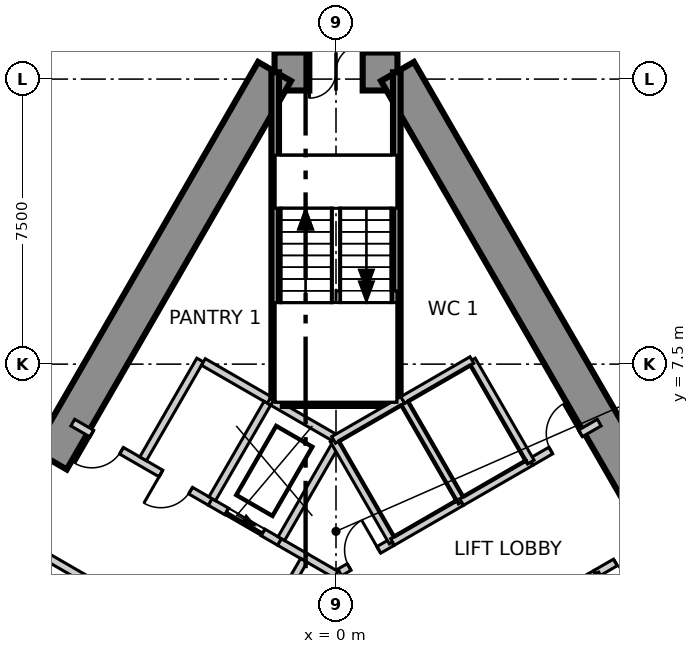
"""IFC4 building model, lengths in metres.
Left out: names, types, materials, properties, quantities, classifications, styles, units other than length and angle.
Written with IfcOpenShell. Run it as: python <this file> out.ifc"""

import sys

from ifc_helpers import new_model, si_unit, direction, frame, frame_2d, origin, place, context, subcontext, project, spatial, polyline, rectangle, outline, extrude, element, fill, save


model = new_model("IFC4")
c1 = context("Model", 3, precision=1e-05, world=origin(), true_north=direction((0.0, 1.0)))
c2 = subcontext(c1, "Body", "Model", "MODEL_VIEW")
j1 = project(units=[si_unit("LENGTHUNIT", "METRE"), si_unit("PLANEANGLEUNIT", "RADIAN")], contexts=[c1])
p1 = place(None, origin())
s1 = spatial("IfcSite", under=j1, at=p1, CompositionType="ELEMENT")
p2 = place(p1, origin())
s2 = spatial("IfcBuilding", under=s1, at=p2, CompositionType="ELEMENT")
p3 = place(p2, frame((0.0, 0.0, -5.5)))
s3 = spatial("IfcBuildingStorey", under=s2, at=p3, CompositionType="ELEMENT", Elevation=-5.5)
for number, where, z_axis, x_axis in (
    (1, (34.944, -16.125, -0.4), (0.0, 0.0, 1.0), (-0.5, 0.866, 0.0)),
    (2, (-3.507, 38.325, -0.4), (0.0, 0.0, 1.0), (-0.5, -0.866, 0.0)),
):
    element("IfcWall", number, at=place(p3, frame(where, z_axis=z_axis, x_axis=x_axis)), inside=s3, PredefinedType="SOLIDWALL", context=c2, shape_type="SweptSolid", body=[
        extrude(rectangle(XDim=62.874, YDim=0.6, at=frame_2d((31.437, 0.0))), origin(), (0.0, 0.0, 1.0), 5.5),
    ])
p4 = place(p3, frame((1.617, 15.2, -0.4), z_axis=(0.0, 0.0, 1.0), x_axis=(-1.0, 0.0, 0.0)))
e3 = element("IfcWall", 3, at=p4, inside=s3, PredefinedType="SHEAR", context=c2, shape_type="SweptSolid", body=[
    extrude(outline(polyline([(-0.288, -0.5), (1.617, -0.5), (3.522, -0.5), (2.945, 0.5), (1.617, 0.5), (0.289, 0.5), (-0.288, -0.5)])), origin(), (0.0, 0.0, 1.0), 5.5),
])
p5 = place(p4, frame((0.917, 0.0, 0.4)))
e4 = element("IfcOpeningElement", 4, at=p5, cuts=e3, PredefinedType="OPENING", context=c2, shape_type="SweptSolid", body=[
    extrude(rectangle(XDim=1.4, YDim=2.1, at=frame_2d((0.7, 1.05))), frame((0.0, 0.51, 0.0), z_axis=(0.0, -1.0, 0.0), x_axis=(1.0, 0.0, 0.0)), (0.0, 0.0, 1.0), 1.02),
])
p6 = place(p3, frame((-1.617, 15.2, -0.4), z_axis=(0.0, 0.0, 1.0), x_axis=(-0.499992141631, -0.866029940768, 0.0)))
e5 = element("IfcWall", 5, at=p6, inside=s3, PredefinedType="SHEAR", context=c2, shape_type="SweptSolid", body=[
    extrude(outline(polyline([(-0.289, -0.499), (1.656, -0.499), (3.601, -0.499), (5.547, -0.499), (7.492, -0.499), (9.437, -0.5), (11.382, -0.5), (13.328, -0.5), (15.273, -0.5), (17.218, -0.5), (19.163, -0.5), (21.109, -0.5), (23.054, -0.5), (24.999, -0.5), (24.422, 0.5), (22.566, 0.5), (20.709, 0.5), (18.853, 0.5), (16.997, 0.5), (15.14, 0.5), (13.284, 0.5), (11.427, 0.5), (9.571, 0.5), (7.715, 0.5), (5.858, 0.5), (4.002, 0.5), (2.146, 0.5), (0.289, 0.5), (-0.289, -0.499)])), origin(), (0.0, 0.0, 1.0), 5.5),
])
p7 = place(p6, frame((11.805, 0.0, 0.4)))
e6 = element("IfcOpeningElement", 6, at=p7, cuts=e5, PredefinedType="OPENING", context=c2, shape_type="SweptSolid", body=[
    extrude(rectangle(XDim=1.1, YDim=2.1, at=frame_2d((0.55, 1.05))), frame((0.0, 0.51, 0.0), z_axis=(0.0, -1.0, 0.0), x_axis=(1.0, 0.0, 0.0)), (0.0, 0.0, 1.0), 1.02),
])
p8 = place(p3, frame((13.972, -6.2, -0.4), z_axis=(0.0, 0.0, 1.0), x_axis=(-0.499992141631, 0.866029940768, 0.0)))
e7 = element("IfcWall", 7, at=p8, inside=s3, PredefinedType="SHEAR", context=c2, shape_type="SweptSolid", body=[
    extrude(outline(polyline([(-0.288, -0.5), (1.657, -0.5), (3.602, -0.5), (5.547, -0.5), (7.493, -0.5), (9.438, -0.5), (11.383, -0.5), (13.328, -0.5), (15.273, -0.5), (17.218, -0.499), (19.164, -0.499), (21.109, -0.499), (23.054, -0.499), (24.999, -0.499), (24.422, 0.5), (22.566, 0.5), (20.709, 0.5), (18.853, 0.5), (16.996, 0.5), (15.14, 0.5), (13.283, 0.5), (11.427, 0.5), (9.57, 0.5), (7.714, 0.5), (5.857, 0.5), (4.001, 0.5), (2.145, 0.5), (0.288, 0.5), (-0.288, -0.5)])), origin(), (0.0, 0.0, 1.0), 5.5),
])
p9 = place(p3, frame((-0.795, 2.422, 0.0), z_axis=(0.0, 0.0, 1.0), x_axis=(0.865893231143, -0.500228859883, 0.0)))
e8 = element("IfcWall", 8, at=p9, inside=s3, PredefinedType="SOLIDWALL", context=c2, shape_type="SweptSolid", body=[
    extrude(rectangle(XDim=0.918, YDim=0.2, at=frame_2d((0.459, 0.0))), origin(), (0.0, 0.0, 1.0), 5.1),
])
p10 = place(p3, frame((0.1, 2.021, 0.0), z_axis=(0.0, 0.0, 1.0), x_axis=(0.866188150584, 0.499718008269, 0.0)))
e9 = element("IfcWall", 9, at=p10, inside=s3, PredefinedType="SOLIDWALL", context=c2, shape_type="SweptSolid", body=[
    extrude(rectangle(XDim=1.585, YDim=0.2, at=frame_2d((0.792, 0.0))), origin(), (0.0, 0.0, 1.0), 5.1),
])
p11 = place(p10, frame((0.284, 0.0, 0.0)))
e10 = element("IfcOpeningElement", 10, at=p11, cuts=e9, PredefinedType="OPENING", context=c2, shape_type="SweptSolid", body=[
    extrude(rectangle(XDim=0.9, YDim=2.1, at=frame_2d((0.45, 1.05))), frame((0.0, 0.11, 0.0), z_axis=(0.0, -1.0, 0.0), x_axis=(1.0, 0.0, 0.0)), (0.0, 0.0, 1.0), 0.22),
])
p12 = place(p3, frame((5.141, 4.931, 0.0), z_axis=(0.0, 0.0, 1.0), x_axis=(0.866041665719, 0.499971832445, 0.0)))
e11 = element("IfcWall", 11, at=p12, inside=s3, PredefinedType="SOLIDWALL", context=c2, shape_type="SweptSolid", body=[
    extrude(rectangle(XDim=2.062, YDim=0.2, at=frame_2d((1.031, 0.0))), origin(), (0.0, 0.0, 1.0), 5.1),
])
p13 = place(p12, frame((0.592, 0.0, 0.0)))
e12 = element("IfcOpeningElement", 12, at=p13, cuts=e11, PredefinedType="OPENING", context=c2, shape_type="SweptSolid", body=[
    extrude(rectangle(XDim=0.9, YDim=2.1, at=frame_2d((0.45, 1.05))), frame((0.0, 0.11, 0.0), z_axis=(0.0, -1.0, 0.0), x_axis=(1.0, 0.0, 0.0)), (0.0, 0.0, 1.0), 0.22),
])
p14 = place(p3, frame((6.841, 1.987, 0.0), z_axis=(0.0, 0.0, 1.0), x_axis=(0.866041665719, 0.499971832445, 0.0)))
e13 = element("IfcWall", 13, at=p14, inside=s3, PredefinedType="SOLIDWALL", context=c2, shape_type="SweptSolid", body=[
    extrude(rectangle(XDim=2.062, YDim=0.2, at=frame_2d((1.031, 0.0))), origin(), (0.0, 0.0, 1.0), 5.1),
])
p15 = place(p14, frame((0.592, 0.0, 0.0)))
e14 = element("IfcOpeningElement", 14, at=p15, cuts=e13, PredefinedType="OPENING", context=c2, shape_type="SweptSolid", body=[
    extrude(rectangle(XDim=0.9, YDim=2.1, at=frame_2d((0.45, 1.05))), frame((0.0, 0.11, 0.0), z_axis=(0.0, -1.0, 0.0), x_axis=(1.0, 0.0, 0.0)), (0.0, 0.0, 1.0), 0.22),
])
p16 = place(p3, frame((-8.627, 3.018, 0.0), z_axis=(0.0, 0.0, 1.0), x_axis=(0.866039775641, -0.499975106388, 0.0)))
e15 = element("IfcWall", 15, at=p16, inside=s3, PredefinedType="SOLIDWALL", context=c2, shape_type="SweptSolid", body=[
    extrude(rectangle(XDim=4.182, YDim=0.2, at=frame_2d((2.091, 0.0))), origin(), (0.0, 0.0, 1.0), 5.1),
])
p17 = place(p16, frame((2.58, 0.0, 0.0)))
e16 = element("IfcOpeningElement", 16, at=p17, cuts=e15, PredefinedType="OPENING", context=c2, shape_type="SweptSolid", body=[
    extrude(rectangle(XDim=1.1, YDim=2.1, at=frame_2d((0.55, 1.05))), frame((0.0, 0.11, 0.0), z_axis=(0.0, -1.0, 0.0), x_axis=(1.0, 0.0, 0.0)), (0.0, 0.0, 1.0), 0.22),
])
p18 = place(p3, frame((-6.927, 5.962, 0.0), z_axis=(0.0, 0.0, 1.0), x_axis=(0.866065051207, -0.49993132236, 0.0)))
e17 = element("IfcWall", 17, at=p18, inside=s3, PredefinedType="SOLIDWALL", context=c2, shape_type="SweptSolid", body=[
    extrude(rectangle(XDim=4.182, YDim=0.2, at=frame_2d((2.091, 0.0))), origin(), (0.0, 0.0, 1.0), 5.1),
])
p19 = place(p18, frame((2.68, 0.0, 0.0)))
e18 = element("IfcOpeningElement", 18, at=p19, cuts=e17, PredefinedType="OPENING", context=c2, shape_type="SweptSolid", body=[
    extrude(rectangle(XDim=0.9, YDim=2.1, at=frame_2d((0.45, 1.05))), frame((0.0, 0.11, 0.0), z_axis=(0.0, -1.0, 0.0), x_axis=(1.0, 0.0, 0.0)), (0.0, 0.0, 1.0), 0.22),
])
p20 = place(p18, frame((0.58, 0.0, 0.0)))
e19 = element("IfcOpeningElement", 19, at=p20, cuts=e17, PredefinedType="OPENING", context=c2, shape_type="SweptSolid", body=[
    extrude(rectangle(XDim=0.9, YDim=2.1, at=frame_2d((0.45, 1.05))), frame((0.0, 0.11, 0.0), z_axis=(0.0, -1.0, 0.0), x_axis=(1.0, 0.0, 0.0)), (0.0, 0.0, 1.0), 0.22),
])
p21 = place(p3, frame((-1.49, 2.823, 0.0), z_axis=(0.0, 0.0, 1.0), x_axis=(0.866251430126, -0.499608306381, 0.0)))
e20 = element("IfcWall", 20, at=p21, inside=s3, PredefinedType="SOLIDWALL", context=c2, shape_type="SweptSolid", body=[
    extrude(rectangle(XDim=0.802, YDim=0.2, at=frame_2d((0.401, 0.0))), origin(), (0.0, 0.0, 1.0), 5.1),
])
p22 = place(p3, frame((-5.076, 5.009, 0.0), z_axis=(0.0, 0.0, 1.0), x_axis=(0.50002537861, 0.866010750942, 0.0)))
e21 = element("IfcWall", 21, at=p22, inside=s3, PredefinedType="SOLIDWALL", context=c2, shape_type="SweptSolid", body=[
    extrude(rectangle(XDim=3.0, YDim=0.2, at=frame_2d((1.5, 0.0))), origin(), (0.0, 0.0, 1.0), 5.1),
])
p23 = place(p3, frame((-3.489, 7.557, 0.0), z_axis=(0.0, 0.0, 1.0), x_axis=(0.866010750942, -0.50002537861, 0.0)))
e22 = element("IfcWall", 22, at=p23, inside=s3, PredefinedType="SOLIDWALL", context=c2, shape_type="SweptSolid", body=[
    extrude(rectangle(XDim=2.0, YDim=0.2, at=frame_2d((1.0, 0.0))), origin(), (0.0, 0.0, 1.0), 5.1),
])
p24 = place(p3, frame((-2.445, -0.436, 0.0), z_axis=(0.0, 0.0, 1.0), x_axis=(0.499929347863, 0.866066190972, 0.0)))
e23 = element("IfcWall", 23, at=p24, inside=s3, PredefinedType="SOLIDWALL", context=c2, shape_type="SweptSolid", body=[
    extrude(rectangle(XDim=3.201, YDim=0.2, at=frame_2d((1.6, 0.0))), origin(), (0.0, 0.0, 1.0), 5.1),
])
p25 = place(p3, frame((-3.309, 3.873, 0.0), z_axis=(0.0, 0.0, 1.0), x_axis=(0.866098583652, -0.499873227325, 0.0)))
e24 = element("IfcWall", 24, at=p25, inside=s3, PredefinedType="SOLIDWALL", context=c2, shape_type="SweptSolid", body=[
    extrude(rectangle(XDim=2.103, YDim=0.2, at=frame_2d((1.051, 0.0))), origin(), (0.0, 0.0, 1.0), 5.1),
])
p26 = place(p25, frame((0.502, 0.0, 0.0)))
e25 = element("IfcOpeningElement", 25, at=p26, cuts=e24, PredefinedType="OPENING", context=c2, shape_type="SweptSolid", body=[
    extrude(rectangle(XDim=1.1, YDim=2.1, at=frame_2d((0.55, 1.05))), frame((0.0, 0.11, 0.0), z_axis=(0.0, -1.0, 0.0), x_axis=(1.0, 0.0, 0.0)), (0.0, 0.0, 1.0), 0.22),
])
p27 = place(p3, frame((-3.257, 3.959, 0.0), z_axis=(0.0, 0.0, 1.0), x_axis=(0.50012328804, 0.865954211699, 0.0)))
e26 = element("IfcWall", 26, at=p27, inside=s3, PredefinedType="SOLIDWALL", context=c2, shape_type="SweptSolid", body=[
    extrude(rectangle(XDim=2.9, YDim=0.2, at=frame_2d((1.45, 0.0))), origin(), (0.0, 0.0, 1.0), 5.1),
])
p28 = place(p3, frame((-1.67, 6.507, 0.0), z_axis=(0.0, 0.0, 1.0), x_axis=(0.865934055563, -0.500158186394, 0.0)))
e27 = element("IfcWall", 27, at=p28, inside=s3, PredefinedType="SOLIDWALL", context=c2, shape_type="SweptSolid", body=[
    extrude(rectangle(XDim=1.908, YDim=0.2, at=frame_2d((0.954, 0.0))), origin(), (0.0, 0.0, 1.0), 5.1),
])
p29 = place(p3, frame((-1.438, 2.909, 0.0), z_axis=(0.0, 0.0, 1.0), x_axis=(0.49977180025, 0.86615711489, 0.0)))
e28 = element("IfcWall", 28, at=p29, inside=s3, PredefinedType="SOLIDWALL", context=c2, shape_type="SweptSolid", body=[
    extrude(rectangle(XDim=2.855, YDim=0.2, at=frame_2d((1.428, 0.0))), origin(), (0.0, 0.0, 1.0), 5.1),
])
p30 = place(p3, frame((1.6, 6.5, 0.0), z_axis=(0.0, 0.0, 1.0), x_axis=(0.0, 1.0, 0.0)))
e29 = element("IfcWall", 29, at=p30, inside=s3, PredefinedType="SOLIDWALL", context=c2, shape_type="SweptSolid", body=[
    extrude(rectangle(XDim=8.68, YDim=0.2, at=frame_2d((4.34, 0.0))), origin(), (0.0, 0.0, 1.0), 5.1),
])
p31 = place(p3, frame((-1.4, 6.5, 0.0), z_axis=(0.0, 0.0, 1.0), x_axis=(1.0, 0.0, 0.0)))
e30 = element("IfcWall", 30, at=p31, inside=s3, PredefinedType="SOLIDWALL", context=c2, shape_type="SweptSolid", body=[
    extrude(rectangle(XDim=2.9, YDim=0.2, at=frame_2d((1.45, 0.0))), origin(), (0.0, 0.0, 1.0), 5.1),
])
p32 = place(p3, frame((-1.6, 6.615, 0.0), z_axis=(0.0, 0.0, 1.0), x_axis=(0.0, 1.0, 0.0)))
e31 = element("IfcWall", 31, at=p32, inside=s3, PredefinedType="SOLIDWALL", context=c2, shape_type="SweptSolid", body=[
    extrude(rectangle(XDim=8.565, YDim=0.2, at=frame_2d((4.282, 0.0))), origin(), (0.0, 0.0, 1.0), 5.1),
])
p33 = place(p3, frame((-0.062, 5.507, 3.9), z_axis=(0.0, 0.0, 1.0), x_axis=(0.499958760481, -0.866049212123, 0.0)))
e32 = element("IfcWall", 32, at=p33, inside=s3, PredefinedType="SOLIDWALL", context=c2, shape_type="SweptSolid", body=[
    extrude(outline(polyline([(0.1, 0.1), (1.55, 0.1), (3.0, 0.1), (3.2, -0.1), (1.55, -0.1), (-0.1, -0.1), (0.1, 0.1)])), origin(), (0.0, 0.0, 1.0), 1.2),
])
p34 = place(p3, frame((1.488, 2.822, 3.9), z_axis=(0.0, 0.0, 1.0), x_axis=(0.866038466041, 0.499977374825, 0.0)))
e33 = element("IfcWall", 33, at=p34, inside=s3, PredefinedType="SOLIDWALL", context=c2, shape_type="SweptSolid", body=[
    extrude(outline(polyline([(2.0, 0.1), (2.2, -0.1), (1.05, -0.1), (-0.099, -0.1), (0.1, 0.1), (0.1, 0.1), (0.1, 0.1), (0.1, 0.1), (0.1, 0.1), (0.1, 0.1), (0.1, 0.1), (0.1, 0.1), (0.1, 0.1), (2.0, 0.1)])), origin(), (0.0, 0.0, 1.0), 1.2),
])
p35 = place(p3, frame((3.307, 3.872, 3.9), z_axis=(0.0, 0.0, 1.0), x_axis=(-0.499933790963, 0.866063626216, 0.0)))
e34 = element("IfcWall", 34, at=p35, inside=s3, PredefinedType="SOLIDWALL", context=c2, shape_type="SweptSolid", body=[
    extrude(outline(polyline([(3.0, 0.1), (3.2, -0.1), (1.55, -0.1), (-0.099, -0.1), (0.1, 0.1), (0.1, 0.1), (0.1, 0.1), (0.1, 0.1), (0.1, 0.1), (0.1, 0.1), (0.1, 0.1), (0.101, 0.1), (0.101, 0.1), (0.101, 0.1), (1.551, 0.1), (3.0, 0.1)])), origin(), (0.0, 0.0, 1.0), 1.2),
])
p36 = place(p3, frame((1.757, 6.557, 3.9), z_axis=(0.0, 0.0, 1.0), x_axis=(-0.866117845619, -0.499839851853, 0.0)))
e35 = element("IfcWall", 35, at=p36, inside=s3, PredefinedType="SOLIDWALL", context=c2, shape_type="SweptSolid", body=[
    extrude(outline(polyline([(2.0, 0.1), (2.0, 0.1), (2.0, 0.1), (2.0, 0.1), (2.0, 0.1), (2.0, 0.1), (2.0, 0.1), (2.0, 0.1), (2.0, 0.1), (2.0, 0.1), (2.2, -0.1), (1.05, -0.1), (-0.099, -0.1), (0.1, 0.1), (0.1, 0.1), (0.1, 0.1), (0.1, 0.1), (0.1, 0.1), (0.1, 0.1), (0.1, 0.1), (0.1, 0.1), (0.1, 0.1), (2.0, 0.1)])), origin(), (0.0, 0.0, 1.0), 1.2),
])
p37 = place(p3, frame((3.307, 3.872, 3.9), z_axis=(0.0, 0.0, 1.0), x_axis=(0.866067520717, 0.499927044236, 0.0)))
e36 = element("IfcWall", 36, at=p37, inside=s3, PredefinedType="SOLIDWALL", context=c2, shape_type="SweptSolid", body=[
    extrude(outline(polyline([(2.0, 0.1), (2.2, -0.1), (1.15, -0.1), (0.101, -0.1), (0.101, -0.1), (0.1, 0.1), (2.0, 0.1)])), origin(), (0.0, 0.0, 1.0), 1.2),
])
p38 = place(p3, frame((5.126, 4.922, 3.9), z_axis=(0.0, 0.0, 1.0), x_axis=(-0.49999285859, 0.86602952684, 0.0)))
e37 = element("IfcWall", 37, at=p38, inside=s3, PredefinedType="SOLIDWALL", context=c2, shape_type="SweptSolid", body=[
    extrude(outline(polyline([(3.0, 0.1), (3.2, -0.1), (1.55, -0.1), (-0.099, -0.1), (0.1, 0.1), (0.1, 0.1), (0.1, 0.1), (0.1, 0.1), (0.1, 0.1), (0.1, 0.1), (0.1, 0.1), (0.101, 0.1), (0.101, 0.1), (0.101, 0.1), (1.551, 0.1), (3.0, 0.1)])), origin(), (0.0, 0.0, 1.0), 1.2),
])
p39 = place(p3, frame((3.576, 7.607, 3.9), z_axis=(0.0, 0.0, 1.0), x_axis=(-0.866038466041, -0.499977374825, 0.0)))
e38 = element("IfcWall", 38, at=p39, inside=s3, PredefinedType="SOLIDWALL", context=c2, shape_type="SweptSolid", body=[
    extrude(outline(polyline([(2.0, 0.1), (2.0, 0.1), (2.0, 0.1), (2.0, -0.1), (0.95, -0.1), (-0.099, -0.1), (0.1, 0.1), (0.1, 0.1), (0.1, 0.1), (0.1, 0.1), (0.1, 0.1), (0.1, 0.1), (0.1, 0.1), (0.1, 0.1), (0.1, 0.1), (2.0, 0.1)])), origin(), (0.0, 0.0, 1.0), 1.2),
])
p40 = place(p3, frame((6.826, 1.978, 3.9), z_axis=(0.0, 0.0, 1.0), x_axis=(-0.866038466041, -0.499977374825, 0.0)))
e39 = element("IfcWall", 39, at=p40, inside=s3, PredefinedType="SOLIDWALL", context=c2, shape_type="SweptSolid", body=[
    extrude(outline(polyline([(0.1, 0.1), (2.0, 0.1), (2.0, -0.1), (0.95, -0.1), (-0.1, -0.1), (0.1, 0.1)])), origin(), (0.0, 0.0, 1.0), 1.2),
])
p41 = place(p3, frame((8.376, -0.707, 3.9), z_axis=(0.0, 0.0, 1.0), x_axis=(-0.499958760481, 0.866049212123, 0.0)))
e40 = element("IfcWall", 40, at=p41, inside=s3, PredefinedType="SOLIDWALL", context=c2, shape_type="SweptSolid", body=[
    extrude(outline(polyline([(3.0, 0.1), (3.0, 0.1), (3.0, 0.1), (3.0, 0.1), (3.0, 0.1), (3.0, 0.1), (3.0, 0.1), (3.0, 0.1), (3.0, 0.1), (3.2, -0.1), (1.55, -0.1), (-0.099, -0.1), (0.1, 0.1), (0.1, 0.1), (0.1, 0.1), (0.1, 0.1), (0.1, 0.1), (0.1, 0.1), (0.1, 0.1), (0.101, 0.1), (0.101, 0.1), (0.101, 0.1), (1.551, 0.1), (3.0, 0.1)])), origin(), (0.0, 0.0, 1.0), 1.2),
])
p42 = place(p26, origin())
e41 = element("IfcDoor", 41, at=p42, inside=s3, OperationType="SLIDING_TO_LEFT", PredefinedType="DOOR", context=c2, shape_type="SweptSolid", body=[
    extrude(rectangle(XDim=1.1, YDim=2.1, at=frame_2d((0.55, 1.05))), frame((0.0, 0.025, 0.0), z_axis=(0.0, -1.0, 0.0), x_axis=(1.0, 0.0, 0.0)), (0.0, 0.0, 1.0), 0.05),
])
fill(e25, e41)
p43 = place(p19, origin())
e42 = element("IfcDoor", 42, at=p43, inside=s3, OperationType="SINGLE_SWING_LEFT", PredefinedType="DOOR", context=c2, shape_type="SweptSolid", body=[
    extrude(rectangle(XDim=0.9, YDim=2.1, at=frame_2d((0.45, 1.05))), frame((0.0, 0.025, 0.0), z_axis=(0.0, -1.0, 0.0), x_axis=(1.0, 0.0, 0.0)), (0.0, 0.0, 1.0), 0.05),
])
fill(e18, e42)
p44 = place(p5, origin())
e43 = element("IfcDoor", 43, at=p44, inside=s3, OperationType="DOUBLE_DOOR_SINGLE_SWING", PredefinedType="DOOR", context=c2, shape_type="SweptSolid", body=[
    extrude(rectangle(XDim=1.4, YDim=2.1, at=frame_2d((0.7, 1.05))), frame((0.0, 0.025, 0.0), z_axis=(0.0, -1.0, 0.0), x_axis=(1.0, 0.0, 0.0)), (0.0, 0.0, 1.0), 0.05),
])
fill(e4, e43)
p45 = place(p11, origin())
e44 = element("IfcDoor", 44, at=p45, inside=s3, OperationType="SINGLE_SWING_LEFT", PredefinedType="DOOR", context=c2, shape_type="SweptSolid", body=[
    extrude(rectangle(XDim=0.9, YDim=2.1, at=frame_2d((0.45, 1.05))), frame((0.0, 0.025, 0.0), z_axis=(0.0, -1.0, 0.0), x_axis=(1.0, 0.0, 0.0)), (0.0, 0.0, 1.0), 0.05),
])
fill(e10, e44)
p46 = place(p20, origin())
e45 = element("IfcDoor", 45, at=p46, inside=s3, OperationType="SINGLE_SWING_LEFT", PredefinedType="DOOR", context=c2, shape_type="SweptSolid", body=[
    extrude(rectangle(XDim=0.9, YDim=2.1, at=frame_2d((0.45, 1.05))), frame((0.0, 0.025, 0.0), z_axis=(0.0, -1.0, 0.0), x_axis=(1.0, 0.0, 0.0)), (0.0, 0.0, 1.0), 0.05),
])
fill(e19, e45)
p47 = place(p13, origin())
e46 = element("IfcDoor", 46, at=p47, inside=s3, OperationType="SINGLE_SWING_LEFT", PredefinedType="DOOR", context=c2, shape_type="SweptSolid", body=[
    extrude(rectangle(XDim=0.9, YDim=2.1, at=frame_2d((0.45, 1.05))), frame((0.0, 0.025, 0.0), z_axis=(0.0, -1.0, 0.0), x_axis=(1.0, 0.0, 0.0)), (0.0, 0.0, 1.0), 0.05),
])
fill(e12, e46)
p48 = place(p15, origin())
e47 = element("IfcDoor", 47, at=p48, inside=s3, OperationType="SINGLE_SWING_RIGHT", PredefinedType="DOOR", context=c2, shape_type="SweptSolid", body=[
    extrude(rectangle(XDim=0.9, YDim=2.1, at=frame_2d((0.45, 1.05))), frame((0.0, 0.025, 0.0), z_axis=(0.0, -1.0, 0.0), x_axis=(1.0, 0.0, 0.0)), (0.0, 0.0, 1.0), 0.05),
])
fill(e14, e47)
save(model, sys.argv[1])
